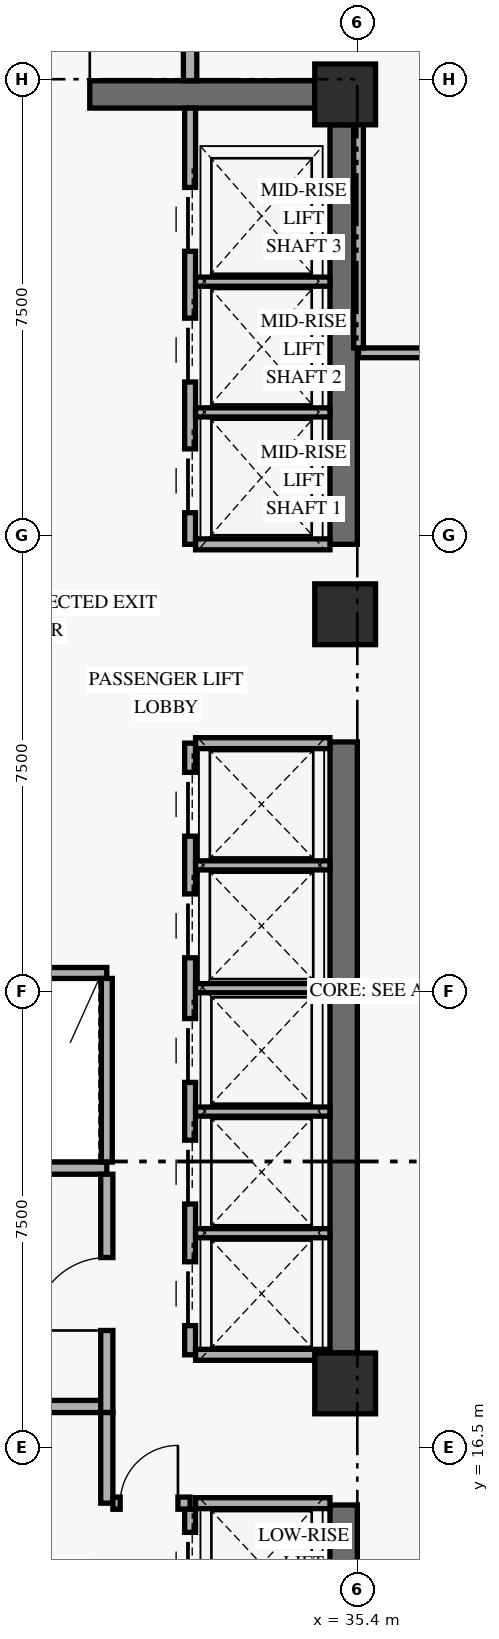
"""IFC4 building model, lengths in metres.
Left out: names, types, materials, properties, quantities, classifications, styles, units other than length and angle.
Written with IfcOpenShell. Run it as: python <this file> out.ifc"""

import sys

from ifc_helpers import new_model, si_unit, direction, frame, frame_2d, origin, origin_2d, place, context, subcontext, project, spatial, rectangle, extrude, element, fill, save


model = new_model("IFC4")
c1 = context("Model", 3, precision=1e-05, world=origin(), true_north=direction((0.0, 1.0)))
c2 = subcontext(c1, "Body", "Model", "MODEL_VIEW")
j1 = project(units=[si_unit("LENGTHUNIT", "METRE"), si_unit("PLANEANGLEUNIT", "RADIAN")], contexts=[c1])
p1 = place(None, origin())
s1 = spatial("IfcSite", under=j1, at=p1, CompositionType="ELEMENT")
p2 = place(p1, origin())
s2 = spatial("IfcBuilding", under=s1, at=p2, CompositionType="ELEMENT")
p3 = place(p2, origin())
s3 = spatial("IfcBuildingStorey", under=s2, at=p3, CompositionType="ELEMENT", Elevation=0.0)
p4 = place(p3, frame((35.175, 9.75, 0.0), z_axis=(0.0, 0.0, 1.0), x_axis=(0.0, 1.0, 0.0)))
e1 = element("IfcWall", 1, at=p4, inside=s3, PredefinedType="SHEAR", context=c2, shape_type="SweptSolid", body=[
    extrude(rectangle(XDim=5.8, YDim=0.45, at=frame_2d((2.9, 0.0))), origin(), (0.0, 0.0, 1.0), 3.539),
])
p5 = place(p3, frame((35.175, 18.05, 0.0), z_axis=(0.0, 0.0, 1.0), x_axis=(0.0, 1.0, 0.0)))
e2 = element("IfcWall", 2, at=p5, inside=s3, PredefinedType="SHEAR", context=c2, shape_type="SweptSolid", body=[
    extrude(rectangle(XDim=10.05, YDim=0.45, at=frame_2d((5.025, 0.0))), origin(), (0.0, 0.0, 1.0), 3.539),
])
p6 = place(p3, frame((35.175, 31.35, 0.0), z_axis=(0.0, 0.0, 1.0), x_axis=(0.0, 1.0, 0.0)))
e3 = element("IfcWall", 3, at=p6, inside=s3, PredefinedType="SHEAR", context=c2, shape_type="SweptSolid", body=[
    extrude(rectangle(XDim=6.9, YDim=0.45, at=frame_2d((3.45, 0.0))), origin(), (0.0, 0.0, 1.0), 3.539),
])
p7 = place(p3, frame((24.7, 38.75, 0.0), z_axis=(0.0, 0.0, 1.0), x_axis=(1.0, 0.0, 0.0)))
e4 = element("IfcWall", 4, at=p7, inside=s3, PredefinedType="SHEAR", context=c2, shape_type="SweptSolid", body=[
    extrude(rectangle(XDim=10.0, YDim=0.45, at=frame_2d((5.0, 0.0))), origin(), (0.0, 0.0, 1.0), 4.39),
])
p8 = place(p7, frame((5.2, 0.0, 0.0)))
e5 = element("IfcOpeningElement", 5, at=p8, cuts=e4, PredefinedType="OPENING", context=c2, shape_type="SweptSolid", body=[
    extrude(rectangle(XDim=1.1, YDim=2.15, at=frame_2d((0.55, 1.075))), frame((0.0, 0.235, 0.0), z_axis=(0.0, -1.0, 0.0), x_axis=(1.0, 0.0, 0.0)), (0.0, 0.0, 1.0), 0.47),
])
for number, where, z_axis, x_axis in (
    (6, (35.2, 17.55, 0.0), (0.0, 0.0, 1.0), (1.0, 0.0, 0.0)),
    (7, (35.2, 30.2, 0.0), (0.0, 0.0, 1.0), (1.0, 0.0, 0.0)),
    (8, (35.2, 38.75, 0.0), (0.0, 0.0, 1.0), (1.0, 0.0, 0.0)),
):
    element("IfcColumn", number, at=place(p3, frame(where, z_axis=z_axis, x_axis=x_axis)), inside=s3, PredefinedType="COLUMN", context=c2, shape_type="SweptSolid", body=[
        extrude(rectangle(XDim=1.0, YDim=1.0, at=origin_2d()), origin(), (0.0, 0.0, 1.0), 4.8),
    ])
p9 = place(p3, frame((24.45, 21.09, 0.0), z_axis=(0.0, 0.0, 1.0), x_axis=(1.0, 0.0, 0.0)))
e9 = element("IfcWall", 9, at=p9, inside=s3, PredefinedType="STANDARD", context=c2, shape_type="SweptSolid", body=[
    extrude(rectangle(XDim=6.83, YDim=0.2, at=frame_2d((3.415, 0.0))), origin(), (0.0, 0.0, 1.0), 4.39),
])
p10 = place(p9, frame((0.72, 0.0, 0.0)))
e10 = element("IfcOpeningElement", 10, at=p10, cuts=e9, PredefinedType="OPENING", context=c2, shape_type="SweptSolid", body=[
    extrude(rectangle(XDim=1.1, YDim=2.2, at=frame_2d((0.55, 1.1))), frame((0.0, 0.11, 0.0), z_axis=(0.0, -1.0, 0.0), x_axis=(1.0, 0.0, 0.0)), (0.0, 0.0, 1.0), 0.22),
])
p11 = place(p9, frame((3.32, 0.0, 0.0)))
e11 = element("IfcOpeningElement", 11, at=p11, cuts=e9, PredefinedType="OPENING", context=c2, shape_type="SweptSolid", body=[
    extrude(rectangle(XDim=1.1, YDim=2.2, at=frame_2d((0.55, 1.1))), frame((0.0, 0.11, 0.0), z_axis=(0.0, -1.0, 0.0), x_axis=(1.0, 0.0, 0.0)), (0.0, 0.0, 1.0), 0.22),
])
p12 = place(p3, frame((28.38, 17.17, 0.0), z_axis=(0.0, 0.0, 1.0), x_axis=(1.0, 0.0, 0.0)))
e12 = element("IfcWall", 12, at=p12, inside=s3, PredefinedType="STANDARD", context=c2, shape_type="SweptSolid", body=[
    extrude(rectangle(XDim=2.9, YDim=0.2, at=frame_2d((1.45, 0.0))), origin(), (0.0, 0.0, 1.0), 4.39),
])
p13 = place(p12, frame((0.85, 0.0, 0.0)))
e13 = element("IfcOpeningElement", 13, at=p13, cuts=e12, PredefinedType="OPENING", context=c2, shape_type="SweptSolid", body=[
    extrude(rectangle(XDim=1.05, YDim=2.15, at=frame_2d((0.525, 1.075))), frame((0.0, 0.11, 0.0), z_axis=(0.0, -1.0, 0.0), x_axis=(1.0, 0.0, 0.0)), (0.0, 0.0, 1.0), 0.22),
])
p14 = place(p3, frame((31.28, 17.07, 0.0), z_axis=(0.0, 0.0, 1.0), x_axis=(0.0, 1.0, 0.0)))
e14 = element("IfcWall", 14, at=p14, inside=s3, PredefinedType="STANDARD", context=c2, shape_type="SweptSolid", body=[
    extrude(rectangle(XDim=3.92, YDim=0.2, at=frame_2d((1.96, 0.0))), origin(), (0.0, 0.0, 1.0), 3.272),
])
p15 = place(p14, frame((1.35, 0.0, 0.0)))
e15 = element("IfcOpeningElement", 15, at=p15, cuts=e14, PredefinedType="OPENING", context=c2, shape_type="SweptSolid", body=[
    extrude(rectangle(XDim=1.2, YDim=2.15, at=frame_2d((0.6, 1.075))), frame((0.0, 0.11, 0.0), z_axis=(0.0, -1.0, 0.0), x_axis=(1.0, 0.0, 0.0)), (0.0, 0.0, 1.0), 0.22),
])
p16 = place(p3, frame((24.45, 24.3, 0.0), z_axis=(0.0, 0.0, 1.0), x_axis=(1.0, 0.0, 0.0)))
e16 = element("IfcWall", 16, at=p16, inside=s3, PredefinedType="STANDARD", context=c2, shape_type="SweptSolid", body=[
    extrude(rectangle(XDim=6.83, YDim=0.18, at=frame_2d((3.415, 0.0))), origin(), (0.0, 0.0, 1.0), 4.39),
])
p17 = place(p3, frame((31.28, 21.19, 0.0), z_axis=(0.0, 0.0, 1.0), x_axis=(0.0, 1.0, 0.0)))
e17 = element("IfcWall", 17, at=p17, inside=s3, PredefinedType="STANDARD", context=c2, shape_type="SweptSolid", body=[
    extrude(rectangle(XDim=3.02, YDim=0.18, at=frame_2d((1.51, 0.0))), origin(), (0.0, 0.0, 1.0), 4.39),
])
p18 = place(p3, frame((31.28, 15.58, 0.0), z_axis=(0.0, 0.0, 1.0), x_axis=(0.0, 1.0, 0.0)))
e18 = element("IfcWall", 18, at=p18, inside=s3, PredefinedType="STANDARD", context=c2, shape_type="SweptSolid", body=[
    extrude(rectangle(XDim=1.49, YDim=0.2, at=frame_2d((0.745, 0.0))), origin(), (0.0, 0.0, 1.0), 4.39),
])
p19 = place(p3, frame((31.38, 15.58, 0.0), z_axis=(0.0, 0.0, 1.0), x_axis=(1.0, 0.0, 0.0)))
e19 = element("IfcWall", 19, at=p19, inside=s3, PredefinedType="STANDARD", context=c2, shape_type="SweptSolid", body=[
    extrude(rectangle(XDim=1.27, YDim=0.2, at=frame_2d((0.635, 0.0))), origin(), (0.0, 0.0, 1.0), 4.39),
])
p20 = place(p19, frame((0.12, 0.0, 0.0)))
e20 = element("IfcOpeningElement", 20, at=p20, cuts=e19, PredefinedType="OPENING", context=c2, shape_type="SweptSolid", body=[
    extrude(rectangle(XDim=0.95, YDim=2.15, at=frame_2d((0.475, 1.075))), frame((0.0, 0.11, 0.0), z_axis=(0.0, -1.0, 0.0), x_axis=(1.0, 0.0, 0.0)), (0.0, 0.0, 1.0), 0.22),
])
p21 = place(p3, frame((32.65, 9.5, 0.0), z_axis=(0.0, 0.0, 1.0), x_axis=(0.0, 1.0, 0.0)))
e21 = element("IfcWall", 21, at=p21, inside=s3, PredefinedType="STANDARD", context=c2, shape_type="SweptSolid", body=[
    extrude(rectangle(XDim=5.98, YDim=0.18, at=frame_2d((2.99, 0.0))), origin(), (0.0, 0.0, 1.0), 4.39),
])
p22 = place(p21, frame((0.55, 0.0, 0.0)))
e22 = element("IfcOpeningElement", 22, at=p22, cuts=e21, PredefinedType="OPENING", context=c2, shape_type="SweptSolid", body=[
    extrude(rectangle(XDim=1.05, YDim=2.2, at=frame_2d((0.525, 1.1))), frame((0.0, 0.1, 0.0), z_axis=(0.0, -1.0, 0.0), x_axis=(1.0, 0.0, 0.0)), (0.0, 0.0, 1.0), 0.2),
])
p23 = place(p21, frame((2.55, 0.0, 0.0)))
e23 = element("IfcOpeningElement", 23, at=p23, cuts=e21, PredefinedType="OPENING", context=c2, shape_type="SweptSolid", body=[
    extrude(rectangle(XDim=1.05, YDim=2.2, at=frame_2d((0.525, 1.1))), frame((0.0, 0.1, 0.0), z_axis=(0.0, -1.0, 0.0), x_axis=(1.0, 0.0, 0.0)), (0.0, 0.0, 1.0), 0.2),
])
p24 = place(p21, frame((4.55, 0.0, 0.0)))
e24 = element("IfcOpeningElement", 24, at=p24, cuts=e21, PredefinedType="OPENING", context=c2, shape_type="SweptSolid", body=[
    extrude(rectangle(XDim=1.05, YDim=2.2, at=frame_2d((0.525, 1.1))), frame((0.0, 0.1, 0.0), z_axis=(0.0, -1.0, 0.0), x_axis=(1.0, 0.0, 0.0)), (0.0, 0.0, 1.0), 0.2),
])
p25 = place(p3, frame((32.74, 15.58, 0.0), z_axis=(0.0, 0.0, 1.0), x_axis=(1.0, 0.0, 0.0)))
e25 = element("IfcWall", 25, at=p25, inside=s3, PredefinedType="STANDARD", context=c2, shape_type="SweptSolid", body=[
    extrude(rectangle(XDim=2.21, YDim=0.18, at=frame_2d((1.105, 0.0))), origin(), (0.0, 0.0, 1.0), 4.39),
])
p26 = place(p3, frame((32.65, 18.02, 0.0), z_axis=(0.0, 0.0, 1.0), x_axis=(0.0, 1.0, 0.0)))
e26 = element("IfcWall", 26, at=p26, inside=s3, PredefinedType="STANDARD", context=c2, shape_type="SweptSolid", body=[
    extrude(rectangle(XDim=10.06, YDim=0.18, at=frame_2d((5.03, 0.0))), origin(), (0.0, 0.0, 1.0), 4.39),
])
p27 = place(p26, frame((0.48, 0.0, 0.0)))
e27 = element("IfcOpeningElement", 27, at=p27, cuts=e26, PredefinedType="OPENING", context=c2, shape_type="SweptSolid", body=[
    extrude(rectangle(XDim=1.05, YDim=2.2, at=frame_2d((0.525, 1.1))), frame((0.0, 0.1, 0.0), z_axis=(0.0, -1.0, 0.0), x_axis=(1.0, 0.0, 0.0)), (0.0, 0.0, 1.0), 0.2),
])
p28 = place(p26, frame((2.48, 0.0, 0.0)))
e28 = element("IfcOpeningElement", 28, at=p28, cuts=e26, PredefinedType="OPENING", context=c2, shape_type="SweptSolid", body=[
    extrude(rectangle(XDim=1.05, YDim=2.2, at=frame_2d((0.525, 1.1))), frame((0.0, 0.1, 0.0), z_axis=(0.0, -1.0, 0.0), x_axis=(1.0, 0.0, 0.0)), (0.0, 0.0, 1.0), 0.2),
])
p29 = place(p26, frame((4.48, 0.0, 0.0)))
e29 = element("IfcOpeningElement", 29, at=p29, cuts=e26, PredefinedType="OPENING", context=c2, shape_type="SweptSolid", body=[
    extrude(rectangle(XDim=1.05, YDim=2.2, at=frame_2d((0.525, 1.1))), frame((0.0, 0.1, 0.0), z_axis=(0.0, -1.0, 0.0), x_axis=(1.0, 0.0, 0.0)), (0.0, 0.0, 1.0), 0.2),
])
p30 = place(p26, frame((6.53, 0.0, 0.0)))
e30 = element("IfcOpeningElement", 30, at=p30, cuts=e26, PredefinedType="OPENING", context=c2, shape_type="SweptSolid", body=[
    extrude(rectangle(XDim=1.05, YDim=2.2, at=frame_2d((0.525, 1.1))), frame((0.0, 0.1, 0.0), z_axis=(0.0, -1.0, 0.0), x_axis=(1.0, 0.0, 0.0)), (0.0, 0.0, 1.0), 0.2),
])
p31 = place(p26, frame((8.53, 0.0, 0.0)))
e31 = element("IfcOpeningElement", 31, at=p31, cuts=e26, PredefinedType="OPENING", context=c2, shape_type="SweptSolid", body=[
    extrude(rectangle(XDim=1.05, YDim=2.2, at=frame_2d((0.525, 1.1))), frame((0.0, 0.1, 0.0), z_axis=(0.0, -1.0, 0.0), x_axis=(1.0, 0.0, 0.0)), (0.0, 0.0, 1.0), 0.2),
])
for number, where, z_axis, x_axis in (
    (32, (32.74, 18.02, 0.0), (0.0, 0.0, 1.0), (1.0, 0.0, 0.0)),
    (33, (32.74, 28.08, 0.0), (0.0, 0.0, 1.0), (1.0, 0.0, 0.0)),
):
    element("IfcWall", number, at=place(p3, frame(where, z_axis=z_axis, x_axis=x_axis)), inside=s3, PredefinedType="STANDARD", context=c2, shape_type="SweptSolid", body=[
        extrude(rectangle(XDim=2.21, YDim=0.18, at=frame_2d((1.105, 0.0))), origin(), (0.0, 0.0, 1.0), 4.39),
    ])
for number, where, z_axis, x_axis in (
    (34, (32.74, 20.02, 0.0), (0.0, 0.0, 1.0), (1.0, 0.0, 0.0)),
    (35, (32.74, 22.02, 0.0), (0.0, 0.0, 1.0), (1.0, 0.0, 0.0)),
    (36, (32.74, 24.05, 0.0), (0.0, 0.0, 1.0), (1.0, 0.0, 0.0)),
    (37, (32.74, 26.07, 0.0), (0.0, 0.0, 1.0), (1.0, 0.0, 0.0)),
):
    element("IfcWall", number, at=place(p3, frame(where, z_axis=z_axis, x_axis=x_axis)), inside=s3, PredefinedType="STANDARD", context=c2, shape_type="SweptSolid", body=[
        extrude(rectangle(XDim=2.21, YDim=0.15, at=frame_2d((1.105, 0.0))), origin(), (0.0, 0.0, 1.0), 4.39),
    ])
p32 = place(p3, frame((32.65, 31.35, 0.0), z_axis=(0.0, 0.0, 1.0), x_axis=(0.0, 1.0, 0.0)))
e38 = element("IfcWall", 38, at=p32, inside=s3, PredefinedType="STANDARD", context=c2, shape_type="SweptSolid", body=[
    extrude(rectangle(XDim=7.175, YDim=0.18, at=frame_2d((3.587, 0.0))), origin(), (0.0, 0.0, 1.0), 4.39),
])
p33 = place(p32, frame((0.52, 0.0, 0.0)))
e39 = element("IfcOpeningElement", 39, at=p33, cuts=e38, PredefinedType="OPENING", context=c2, shape_type="SweptSolid", body=[
    extrude(rectangle(XDim=1.05, YDim=2.2, at=frame_2d((0.525, 1.1))), frame((0.0, 0.1, 0.0), z_axis=(0.0, -1.0, 0.0), x_axis=(1.0, 0.0, 0.0)), (0.0, 0.0, 1.0), 0.2),
])
p34 = place(p32, frame((2.67, 0.0, 0.0)))
e40 = element("IfcOpeningElement", 40, at=p34, cuts=e38, PredefinedType="OPENING", context=c2, shape_type="SweptSolid", body=[
    extrude(rectangle(XDim=1.05, YDim=2.2, at=frame_2d((0.525, 1.1))), frame((0.0, 0.1, 0.0), z_axis=(0.0, -1.0, 0.0), x_axis=(1.0, 0.0, 0.0)), (0.0, 0.0, 1.0), 0.2),
])
p35 = place(p32, frame((4.82, 0.0, 0.0)))
e41 = element("IfcOpeningElement", 41, at=p35, cuts=e38, PredefinedType="OPENING", context=c2, shape_type="SweptSolid", body=[
    extrude(rectangle(XDim=1.05, YDim=2.2, at=frame_2d((0.525, 1.1))), frame((0.0, 0.1, 0.0), z_axis=(0.0, -1.0, 0.0), x_axis=(1.0, 0.0, 0.0)), (0.0, 0.0, 1.0), 0.2),
])
p36 = place(p3, frame((32.74, 31.35, 0.0), z_axis=(0.0, 0.0, 1.0), x_axis=(1.0, 0.0, 0.0)))
e42 = element("IfcWall", 42, at=p36, inside=s3, PredefinedType="STANDARD", context=c2, shape_type="SweptSolid", body=[
    extrude(rectangle(XDim=2.21, YDim=0.18, at=frame_2d((1.105, 0.0))), origin(), (0.0, 0.0, 1.0), 4.39),
])
for number, where, z_axis, x_axis in (
    (43, (32.74, 33.52, 0.0), (0.0, 0.0, 1.0), (1.0, 0.0, 0.0)),
    (44, (32.74, 35.67, 0.0), (0.0, 0.0, 1.0), (1.0, 0.0, 0.0)),
):
    element("IfcWall", number, at=place(p3, frame(where, z_axis=z_axis, x_axis=x_axis)), inside=s3, PredefinedType="STANDARD", context=c2, shape_type="SweptSolid", body=[
        extrude(rectangle(XDim=2.21, YDim=0.15, at=frame_2d((1.105, 0.0))), origin(), (0.0, 0.0, 1.0), 4.39),
    ])
p37 = place(p3, frame((32.65, 38.975, 0.0), z_axis=(0.0, 0.0, 1.0), x_axis=(0.0, 1.0, 0.0)))
e45 = element("IfcWall", 45, at=p37, inside=s3, PredefinedType="STANDARD", context=c2, shape_type="SweptSolid", body=[
    extrude(rectangle(XDim=16.505, YDim=0.22, at=frame_2d((8.252, 0.0))), origin(), (0.0, 0.0, 1.0), 3.272),
])
p38 = place(p37, frame((3.575, 0.0, 0.0)))
e46 = element("IfcOpeningElement", 46, at=p38, cuts=e45, PredefinedType="OPENING", context=c2, shape_type="SweptSolid", body=[
    extrude(rectangle(XDim=1.05, YDim=2.15, at=frame_2d((0.525, 1.075))), frame((0.0, 0.12, 0.0), z_axis=(0.0, -1.0, 0.0), x_axis=(1.0, 0.0, 0.0)), (0.0, 0.0, 1.0), 0.24),
])
p39 = place(p3, frame((35.42, 34.5, 0.0), z_axis=(0.0, 0.0, 1.0), x_axis=(1.0, 0.0, 0.0)))
e47 = element("IfcWall", 47, at=p39, inside=s3, PredefinedType="PARTITIONING", context=c2, shape_type="SweptSolid", body=[
    extrude(rectangle(XDim=20.26, YDim=0.16, at=frame_2d((10.13, 0.0))), origin(), (0.0, 0.0, 1.0), 3.521),
])
p40 = place(p39, frame((2.1, 0.0, 0.0)))
e48 = element("IfcOpeningElement", 48, at=p40, cuts=e47, PredefinedType="OPENING", context=c2, shape_type="SweptSolid", body=[
    extrude(rectangle(XDim=0.92, YDim=2.14, at=frame_2d((0.46, 1.07))), frame((0.0, 0.09, 0.0), z_axis=(0.0, -1.0, 0.0), x_axis=(1.0, 0.0, 0.0)), (0.0, 0.0, 1.0), 0.18),
])
p41 = place(p39, frame((11.2, 0.0, 0.0)))
e49 = element("IfcOpeningElement", 49, at=p41, cuts=e47, PredefinedType="OPENING", context=c2, shape_type="SweptSolid", body=[
    extrude(rectangle(XDim=0.95, YDim=2.15, at=frame_2d((0.475, 1.075))), frame((0.0, 0.09, 0.0), z_axis=(0.0, -1.0, 0.0), x_axis=(1.0, 0.0, 0.0)), (0.0, 0.0, 1.0), 0.18),
])
p42 = place(p3, frame((35.42, 34.58, 0.0), z_axis=(0.0, 0.0, 1.0), x_axis=(0.0, 1.0, 0.0)))
e50 = element("IfcWall", 50, at=p42, inside=s3, PredefinedType="PARTITIONING", context=c2, shape_type="SweptSolid", body=[
    extrude(rectangle(XDim=4.17, YDim=0.16, at=frame_2d((2.085, 0.0))), origin(), (0.0, 0.0, 1.0), 3.521),
])
p43 = place(p15, origin())
e51 = element("IfcDoor", 51, at=p43, inside=s3, OperationType="SINGLE_SWING_LEFT", PredefinedType="DOOR", context=c2, shape_type="SweptSolid", body=[
    extrude(rectangle(XDim=1.2, YDim=2.15, at=frame_2d((0.6, 1.075))), frame((0.0, 0.025, 0.0), z_axis=(0.0, -1.0, 0.0), x_axis=(1.0, 0.0, 0.0)), (0.0, 0.0, 1.0), 0.05),
])
fill(e15, e51)
p44 = place(p20, frame((0.95, 0.0, 0.0), z_axis=(0.0, 0.0, 1.0), x_axis=(-1.0, 0.0, 0.0)))
e52 = element("IfcDoor", 52, at=p44, inside=s3, OperationType="SINGLE_SWING_LEFT", PredefinedType="DOOR", context=c2, shape_type="SweptSolid", body=[
    extrude(rectangle(XDim=0.95, YDim=2.15, at=frame_2d((0.475, 1.075))), frame((0.0, 0.025, 0.0), z_axis=(0.0, -1.0, 0.0), x_axis=(1.0, 0.0, 0.0)), (0.0, 0.0, 1.0), 0.05),
])
fill(e20, e52)
p45 = place(p24, origin())
e53 = element("IfcDoor", 53, at=p45, inside=s3, OperationType="SLIDING_TO_LEFT", PredefinedType="DOOR", context=c2, shape_type="SweptSolid", body=[
    extrude(rectangle(XDim=1.05, YDim=2.2, at=frame_2d((0.525, 1.1))), frame((0.0, 0.025, 0.0), z_axis=(0.0, -1.0, 0.0), x_axis=(1.0, 0.0, 0.0)), (0.0, 0.0, 1.0), 0.05),
])
fill(e24, e53)
p46 = place(p27, origin())
e54 = element("IfcDoor", 54, at=p46, inside=s3, OperationType="SLIDING_TO_LEFT", PredefinedType="DOOR", context=c2, shape_type="SweptSolid", body=[
    extrude(rectangle(XDim=1.05, YDim=2.2, at=frame_2d((0.525, 1.1))), frame((0.0, 0.025, 0.0), z_axis=(0.0, -1.0, 0.0), x_axis=(1.0, 0.0, 0.0)), (0.0, 0.0, 1.0), 0.05),
])
fill(e27, e54)
p47 = place(p28, origin())
e55 = element("IfcDoor", 55, at=p47, inside=s3, OperationType="SLIDING_TO_LEFT", PredefinedType="DOOR", context=c2, shape_type="SweptSolid", body=[
    extrude(rectangle(XDim=1.05, YDim=2.2, at=frame_2d((0.525, 1.1))), frame((0.0, 0.025, 0.0), z_axis=(0.0, -1.0, 0.0), x_axis=(1.0, 0.0, 0.0)), (0.0, 0.0, 1.0), 0.05),
])
fill(e28, e55)
p48 = place(p29, origin())
e56 = element("IfcDoor", 56, at=p48, inside=s3, OperationType="SLIDING_TO_LEFT", PredefinedType="DOOR", context=c2, shape_type="SweptSolid", body=[
    extrude(rectangle(XDim=1.05, YDim=2.2, at=frame_2d((0.525, 1.1))), frame((0.0, 0.025, 0.0), z_axis=(0.0, -1.0, 0.0), x_axis=(1.0, 0.0, 0.0)), (0.0, 0.0, 1.0), 0.05),
])
fill(e29, e56)
p49 = place(p30, origin())
e57 = element("IfcDoor", 57, at=p49, inside=s3, OperationType="SLIDING_TO_LEFT", PredefinedType="DOOR", context=c2, shape_type="SweptSolid", body=[
    extrude(rectangle(XDim=1.05, YDim=2.2, at=frame_2d((0.525, 1.1))), frame((0.0, 0.025, 0.0), z_axis=(0.0, -1.0, 0.0), x_axis=(1.0, 0.0, 0.0)), (0.0, 0.0, 1.0), 0.05),
])
fill(e30, e57)
p50 = place(p31, origin())
e58 = element("IfcDoor", 58, at=p50, inside=s3, OperationType="SLIDING_TO_LEFT", PredefinedType="DOOR", context=c2, shape_type="SweptSolid", body=[
    extrude(rectangle(XDim=1.05, YDim=2.2, at=frame_2d((0.525, 1.1))), frame((0.0, 0.025, 0.0), z_axis=(0.0, -1.0, 0.0), x_axis=(1.0, 0.0, 0.0)), (0.0, 0.0, 1.0), 0.05),
])
fill(e31, e58)
p51 = place(p33, origin())
e59 = element("IfcDoor", 59, at=p51, inside=s3, OperationType="SLIDING_TO_LEFT", PredefinedType="DOOR", context=c2, shape_type="SweptSolid", body=[
    extrude(rectangle(XDim=1.05, YDim=2.2, at=frame_2d((0.525, 1.1))), frame((0.0, 0.025, 0.0), z_axis=(0.0, -1.0, 0.0), x_axis=(1.0, 0.0, 0.0)), (0.0, 0.0, 1.0), 0.05),
])
fill(e39, e59)
p52 = place(p34, origin())
e60 = element("IfcDoor", 60, at=p52, inside=s3, OperationType="SLIDING_TO_LEFT", PredefinedType="DOOR", context=c2, shape_type="SweptSolid", body=[
    extrude(rectangle(XDim=1.05, YDim=2.2, at=frame_2d((0.525, 1.1))), frame((0.0, 0.025, 0.0), z_axis=(0.0, -1.0, 0.0), x_axis=(1.0, 0.0, 0.0)), (0.0, 0.0, 1.0), 0.05),
])
fill(e40, e60)
p53 = place(p35, origin())
e61 = element("IfcDoor", 61, at=p53, inside=s3, OperationType="SLIDING_TO_LEFT", PredefinedType="DOOR", context=c2, shape_type="SweptSolid", body=[
    extrude(rectangle(XDim=1.05, YDim=2.2, at=frame_2d((0.525, 1.1))), frame((0.0, 0.025, 0.0), z_axis=(0.0, -1.0, 0.0), x_axis=(1.0, 0.0, 0.0)), (0.0, 0.0, 1.0), 0.05),
])
fill(e41, e61)
p54 = place(p8, origin())
e62 = element("IfcDoor", 62, at=p54, inside=s3, OperationType="SINGLE_SWING_RIGHT", PredefinedType="DOOR", context=c2, shape_type="SweptSolid", body=[
    extrude(rectangle(XDim=1.1, YDim=2.15, at=frame_2d((0.55, 1.075))), frame((0.0, 0.025, 0.0), z_axis=(0.0, -1.0, 0.0), x_axis=(1.0, 0.0, 0.0)), (0.0, 0.0, 1.0), 0.05),
])
fill(e5, e62)
save(model, sys.argv[1])
